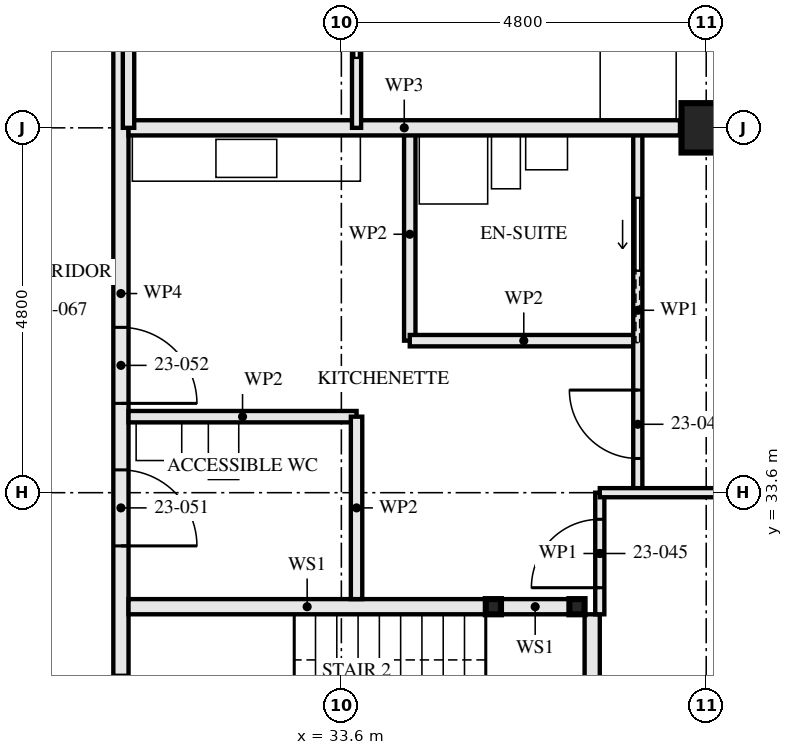
"""IFC4 building model, lengths in metres.
Left out: names, types, materials, properties, quantities, classifications, styles, units other than length and angle.
Written with IfcOpenShell. Run it as: python <this file> out.ifc"""

import sys

from ifc_helpers import new_model, si_unit, direction, frame, frame_2d, origin, origin_2d, place, context, subcontext, project, spatial, rectangle, hollow_rectangle, extrude, element, fill, save


model = new_model("IFC4")
c1 = context("Model", 3, precision=1e-05, world=origin(), true_north=direction((0.0, 1.0)))
c2 = subcontext(c1, "Body", "Model", "MODEL_VIEW")
j1 = project(units=[si_unit("LENGTHUNIT", "METRE"), si_unit("PLANEANGLEUNIT", "RADIAN")], contexts=[c1])
p1 = place(None, origin())
s1 = spatial("IfcSite", under=j1, at=p1, CompositionType="ELEMENT")
p2 = place(p1, origin())
s2 = spatial("IfcBuilding", under=s1, at=p2, CompositionType="ELEMENT")
p3 = place(p2, frame((0.0, 0.0, 87.5)))
s3 = spatial("IfcBuildingStorey", under=s2, at=p3, CompositionType="ELEMENT", Elevation=87.5)
p4 = place(p3, frame((38.4, 38.4, 0.0), z_axis=(0.0, 0.0, 1.0), x_axis=(0.0, 1.0, 0.0)))
e1 = element("IfcColumn", 1, at=p4, inside=s3, PredefinedType="COLUMN", context=c2, shape_type="SweptSolid", body=[
    extrude(hollow_rectangle(XDim=0.65, YDim=0.65, WallThickness=0.08, at=origin_2d()), origin(), (0.0, 0.0, 1.0), 3.5),
])
for number, where, z_axis, x_axis in (
    (2, (36.7, 32.1, 0.0), (0.0, 0.0, 1.0), (1.0, 0.0, 0.0)),
    (3, (35.6, 32.1, 0.0), (0.0, 0.0, 1.0), (1.0, 0.0, 0.0)),
):
    element("IfcColumn", number, at=place(p3, frame(where, z_axis=z_axis, x_axis=x_axis)), inside=s3, PredefinedType="COLUMN", context=c2, shape_type="SweptSolid", body=[
        extrude(hollow_rectangle(XDim=0.2, YDim=0.2, WallThickness=0.008, at=origin_2d()), origin(), (0.0, 0.0, 1.0), 3.33),
    ])
p5 = place(p3, frame((36.6, 32.1, 0.0), z_axis=(0.0, 0.0, 1.0), x_axis=(-1.0, 0.0, 0.0)))
e4 = element("IfcWall", 4, at=p5, inside=s3, PredefinedType="SOLIDWALL", context=c2, shape_type="SweptSolid", body=[
    extrude(rectangle(XDim=0.9, YDim=0.2, at=frame_2d((0.45, 0.0))), origin(), (0.0, 0.0, 1.0), 2.99),
])
p6 = place(p3, frame((35.5, 32.1, 0.0), z_axis=(0.0, 0.0, 1.0), x_axis=(-1.0, 0.0, 0.0)))
e5 = element("IfcWall", 5, at=p6, inside=s3, PredefinedType="SOLIDWALL", context=c2, shape_type="SweptSolid", body=[
    extrude(rectangle(XDim=4.7, YDim=0.2, at=frame_2d((2.35, 0.0))), origin(), (0.0, 0.0, 1.0), 2.99),
])
p7 = place(p3, frame((36.9, 29.4, 0.0), z_axis=(0.0, 0.0, 1.0), x_axis=(0.0, 1.0, 0.0)))
e6 = element("IfcWall", 6, at=p7, inside=s3, PredefinedType="SOLIDWALL", context=c2, shape_type="SweptSolid", body=[
    extrude(rectangle(XDim=2.6, YDim=0.2, at=frame_2d((1.3, 0.0))), origin(), (0.0, 0.0, 1.0), 3.33),
])
p8 = place(p3, frame((33.8, 32.2, 0.0), z_axis=(0.0, 0.0, 1.0), x_axis=(0.0, 1.0, 0.0)))
e7 = element("IfcWall", 7, at=p8, inside=s3, PredefinedType="PARTITIONING", context=c2, shape_type="SweptSolid", body=[
    extrude(rectangle(XDim=2.4, YDim=0.15, at=frame_2d((1.2, 0.0))), origin(), (0.0, 0.0, 1.0), 2.55),
])
for number, where, z_axis, x_axis in (
    (8, (33.8, 34.6, 0.0), (0.0, 0.0, 1.0), (-1.0, 0.0, 0.0)),
    (9, (37.5, 35.6, 0.0), (0.0, 0.0, 1.0), (-1.0, 0.0, 0.0)),
):
    element("IfcWall", number, at=place(p3, frame(where, z_axis=z_axis, x_axis=x_axis)), inside=s3, PredefinedType="PARTITIONING", context=c2, shape_type="SweptSolid", body=[
        extrude(rectangle(XDim=3.0, YDim=0.15, at=frame_2d((1.5, 0.0))), origin(), (0.0, 0.0, 1.0), 3.33),
    ])
p9 = place(p3, frame((34.5, 35.6, 0.0), z_axis=(0.0, 0.0, 1.0), x_axis=(0.0, 1.0, 0.0)))
e10 = element("IfcWall", 10, at=p9, inside=s3, PredefinedType="PARTITIONING", context=c2, shape_type="SweptSolid", body=[
    extrude(rectangle(XDim=2.8, YDim=0.15, at=frame_2d((1.4, 0.0))), origin(), (0.0, 0.0, 1.0), 3.33),
])
p10 = place(p3, frame((37.0, 32.0, 0.0), z_axis=(0.0, 0.0, 1.0), x_axis=(0.0, 1.0, 0.0)))
e11 = element("IfcWall", 11, at=p10, inside=s3, PredefinedType="PARTITIONING", context=c2, shape_type="SweptSolid", body=[
    extrude(rectangle(XDim=1.6, YDim=0.12, at=frame_2d((0.8, 0.0))), origin(), (0.0, 0.0, 1.0), 3.33),
])
p11 = place(p10, frame((0.35, 0.0, 0.0)))
e12 = element("IfcOpeningElement", 12, at=p11, cuts=e11, PredefinedType="OPENING", context=c2, shape_type="SweptSolid", body=[
    extrude(rectangle(XDim=0.9, YDim=2.1, at=frame_2d((0.45, 1.05))), frame((0.0, 0.071, 0.0), z_axis=(0.0, -1.0, 0.0), x_axis=(1.0, 0.0, 0.0)), (0.0, 0.0, 1.0), 0.141),
])
p12 = place(p3, frame((37.5, 33.6, 0.0), z_axis=(0.0, 0.0, 1.0), x_axis=(0.0, 1.0, 0.0)))
e13 = element("IfcWall", 13, at=p12, inside=s3, PredefinedType="PARTITIONING", context=c2, shape_type="SweptSolid", body=[
    extrude(rectangle(XDim=4.8, YDim=0.12, at=frame_2d((2.4, 0.0))), origin(), (0.0, 0.0, 1.0), 3.33),
])
p13 = place(p12, frame((0.45, 0.0, 0.0)))
e14 = element("IfcOpeningElement", 14, at=p13, cuts=e13, PredefinedType="OPENING", context=c2, shape_type="SweptSolid", body=[
    extrude(rectangle(XDim=0.9, YDim=2.1, at=frame_2d((0.45, 1.05))), frame((0.0, 0.071, 0.0), z_axis=(0.0, -1.0, 0.0), x_axis=(1.0, 0.0, 0.0)), (0.0, 0.0, 1.0), 0.141),
])
p14 = place(p12, frame((2.925, 0.0, 0.0)))
e15 = element("IfcOpeningElement", 15, at=p14, cuts=e13, PredefinedType="OPENING", context=c2, shape_type="SweptSolid", body=[
    extrude(rectangle(XDim=0.95, YDim=2.1, at=frame_2d((0.475, 1.05))), frame((0.0, 0.071, 0.0), z_axis=(0.0, -1.0, 0.0), x_axis=(1.0, 0.0, 0.0)), (0.0, 0.0, 1.0), 0.141),
])
p15 = place(p3, frame((42.855, 33.6, 0.0), z_axis=(0.0, 0.0, 1.0), x_axis=(-1.0, 0.0, 0.0)))
e16 = element("IfcWall", 16, at=p15, inside=s3, PredefinedType="PARTITIONING", context=c2, shape_type="SweptSolid", body=[
    extrude(rectangle(XDim=5.855, YDim=0.12, at=frame_2d((2.927, 0.0))), origin(), (0.0, 0.0, 1.0), 2.55),
])
p16 = place(p3, frame((38.055, 38.4, 0.0), z_axis=(0.0, 0.0, 1.0), x_axis=(-1.0, 0.0, 0.0)))
e17 = element("IfcWall", 17, at=p16, inside=s3, PredefinedType="PARTITIONING", context=c2, shape_type="SweptSolid", body=[
    extrude(rectangle(XDim=7.255, YDim=0.2, at=frame_2d((3.627, 0.0))), origin(), (0.0, 0.0, 1.0), 2.55),
])
p17 = place(p3, frame((30.8, 38.4, 0.0), z_axis=(0.0, 0.0, 1.0), x_axis=(0.0, 1.0, 0.0)))
e18 = element("IfcWall", 18, at=p17, inside=s3, PredefinedType="PARTITIONING", context=c2, shape_type="SweptSolid", body=[
    extrude(rectangle(XDim=2.8, YDim=0.15, at=frame_2d((1.4, 0.0))), origin(), (0.0, 0.0, 1.0), 3.33),
])
p18 = place(p3, frame((33.8, 38.4, 0.0), z_axis=(0.0, 0.0, 1.0), x_axis=(0.0, 1.0, 0.0)))
e19 = element("IfcWall", 19, at=p18, inside=s3, PredefinedType="PARTITIONING", context=c2, shape_type="SweptSolid", body=[
    extrude(rectangle(XDim=4.48, YDim=0.12, at=frame_2d((2.24, 0.0))), origin(), (0.0, 0.0, 1.0), 3.33),
])
p19 = place(p18, frame((2.975, 0.0, 0.0)))
e20 = element("IfcOpeningElement", 20, at=p19, cuts=e19, PredefinedType="OPENING", context=c2, shape_type="SweptSolid", body=[
    extrude(rectangle(XDim=0.9, YDim=2.1, at=frame_2d((0.45, 1.05))), frame((0.0, 0.071, 0.0), z_axis=(0.0, -1.0, 0.0), x_axis=(1.0, 0.0, 0.0)), (0.0, 0.0, 1.0), 0.141),
])
p20 = place(p18, frame((0.925, 0.0, 0.0)))
e21 = element("IfcOpeningElement", 21, at=p20, cuts=e19, PredefinedType="OPENING", context=c2, shape_type="SweptSolid", body=[
    extrude(rectangle(XDim=0.95, YDim=2.1, at=frame_2d((0.475, 1.05))), frame((0.0, 0.071, 0.0), z_axis=(0.0, -1.0, 0.0), x_axis=(1.0, 0.0, 0.0)), (0.0, 0.0, 1.0), 0.141),
])
p21 = place(p3, frame((30.7, 28.8, 0.0), z_axis=(0.0, 0.0, 1.0), x_axis=(0.0, 1.0, 0.0)))
e22 = element("IfcWall", 22, at=p21, inside=s3, PredefinedType="PARTITIONING", context=c2, shape_type="SweptSolid", body=[
    extrude(rectangle(XDim=14.84, YDim=0.2, at=frame_2d((7.42, 0.0))), origin(), (0.0, 0.0, 1.0), 2.32),
])
p22 = place(p21, frame((1.4, 0.0, 0.0)))
e23 = element("IfcOpeningElement", 23, at=p22, cuts=e22, PredefinedType="OPENING", context=c2, shape_type="SweptSolid", body=[
    extrude(rectangle(XDim=1.0, YDim=2.1, at=frame_2d((0.5, 1.05))), frame((0.0, 0.111, 0.0), z_axis=(0.0, -1.0, 0.0), x_axis=(1.0, 0.0, 0.0)), (0.0, 0.0, 1.0), 0.221),
])
p23 = place(p21, frame((4.1, 0.0, 0.0)))
e24 = element("IfcOpeningElement", 24, at=p23, cuts=e22, PredefinedType="OPENING", context=c2, shape_type="SweptSolid", body=[
    extrude(rectangle(XDim=1.0, YDim=2.1, at=frame_2d((0.5, 1.05))), frame((0.0, 0.111, 0.0), z_axis=(0.0, -1.0, 0.0), x_axis=(1.0, 0.0, 0.0)), (0.0, 0.0, 1.0), 0.221),
])
p24 = place(p21, frame((5.975, 0.0, 0.0)))
e25 = element("IfcOpeningElement", 25, at=p24, cuts=e22, PredefinedType="OPENING", context=c2, shape_type="SweptSolid", body=[
    extrude(rectangle(XDim=1.0, YDim=2.1, at=frame_2d((0.5, 1.05))), frame((0.0, 0.111, 0.0), z_axis=(0.0, -1.0, 0.0), x_axis=(1.0, 0.0, 0.0)), (0.0, 0.0, 1.0), 0.221),
])
p25 = place(p21, frame((13.0, 0.0, 0.0)))
e26 = element("IfcOpeningElement", 26, at=p25, cuts=e22, PredefinedType="OPENING", context=c2, shape_type="SweptSolid", body=[
    extrude(rectangle(XDim=1.0, YDim=2.1, at=frame_2d((0.5, 1.05))), frame((0.0, 0.111, 0.0), z_axis=(0.0, -1.0, 0.0), x_axis=(1.0, 0.0, 0.0)), (0.0, 0.0, 1.0), 0.221),
])
p26 = place(p11, origin())
e27 = element("IfcDoor", 27, at=p26, inside=s3, OperationType="SINGLE_SWING_RIGHT", PredefinedType="DOOR", context=c2, shape_type="SweptSolid", body=[
    extrude(rectangle(XDim=0.9, YDim=2.1, at=frame_2d((0.45, 1.05))), frame((0.0, 0.022, 0.0), z_axis=(0.0, -1.0, 0.0), x_axis=(1.0, 0.0, 0.0)), (0.0, 0.0, 1.0), 0.044),
])
fill(e12, e27)
p27 = place(p13, origin())
e28 = element("IfcDoor", 28, at=p27, inside=s3, OperationType="SINGLE_SWING_LEFT", PredefinedType="DOOR", context=c2, shape_type="SweptSolid", body=[
    extrude(rectangle(XDim=0.9, YDim=2.1, at=frame_2d((0.45, 1.05))), frame((0.0, 0.022, 0.0), z_axis=(0.0, -1.0, 0.0), x_axis=(1.0, 0.0, 0.0)), (0.0, 0.0, 1.0), 0.044),
])
fill(e14, e28)
p28 = place(p14, origin())
e29 = element("IfcDoor", 29, at=p28, inside=s3, OperationType="SLIDING_TO_RIGHT", PredefinedType="DOOR", context=c2, shape_type="SweptSolid", body=[
    extrude(rectangle(XDim=0.95, YDim=2.1, at=frame_2d((0.475, 1.05))), frame((0.0, 0.022, 0.0), z_axis=(0.0, -1.0, 0.0), x_axis=(1.0, 0.0, 0.0)), (0.0, 0.0, 1.0), 0.044),
])
fill(e15, e29)
p29 = place(p20, origin())
e30 = element("IfcDoor", 30, at=p29, inside=s3, OperationType="SLIDING_TO_LEFT", PredefinedType="DOOR", context=c2, shape_type="SweptSolid", body=[
    extrude(rectangle(XDim=0.95, YDim=2.1, at=frame_2d((0.475, 1.05))), frame((0.0, 0.022, 0.0), z_axis=(0.0, -1.0, 0.0), x_axis=(1.0, 0.0, 0.0)), (0.0, 0.0, 1.0), 0.044),
])
fill(e21, e30)
p30 = place(p23, frame((1.0, 0.0, 0.0), z_axis=(0.0, 0.0, 1.0), x_axis=(-1.0, 0.0, 0.0)))
e31 = element("IfcDoor", 31, at=p30, inside=s3, OperationType="SINGLE_SWING_LEFT", PredefinedType="DOOR", context=c2, shape_type="SweptSolid", body=[
    extrude(rectangle(XDim=1.0, YDim=2.1, at=frame_2d((0.5, 1.05))), frame((0.0, 0.027, 0.0), z_axis=(0.0, -1.0, 0.0), x_axis=(1.0, 0.0, 0.0)), (0.0, 0.0, 1.0), 0.054),
])
fill(e24, e31)
p31 = place(p24, frame((1.0, 0.0, 0.0), z_axis=(0.0, 0.0, 1.0), x_axis=(-1.0, 0.0, 0.0)))
e32 = element("IfcDoor", 32, at=p31, inside=s3, OperationType="SINGLE_SWING_LEFT", PredefinedType="DOOR", context=c2, shape_type="SweptSolid", body=[
    extrude(rectangle(XDim=1.0, YDim=2.1, at=frame_2d((0.5, 1.05))), frame((0.0, 0.027, 0.0), z_axis=(0.0, -1.0, 0.0), x_axis=(1.0, 0.0, 0.0)), (0.0, 0.0, 1.0), 0.054),
])
fill(e25, e32)
save(model, sys.argv[1])
